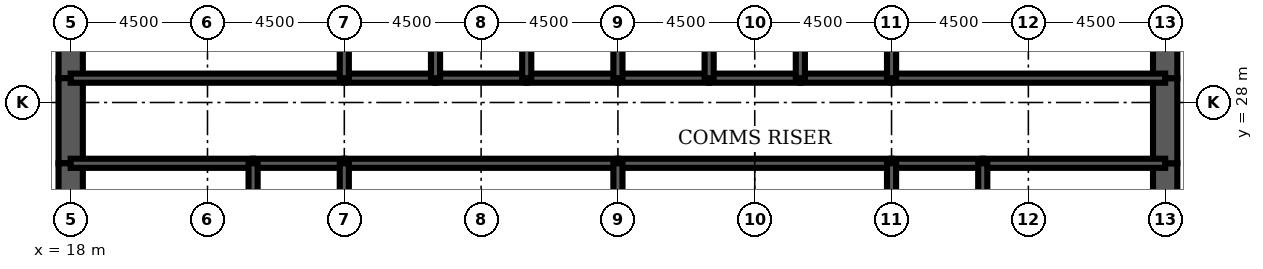
"""IFC4 building model, lengths in metres.
Left out: names, types, materials, properties, quantities, classifications, styles, units other than length and angle.
Written with IfcOpenShell. Run it as: python <this file> out.ifc"""

import sys

from ifc_helpers import new_model, si_unit, direction, frame, frame_2d, origin, place, context, subcontext, project, spatial, rectangle, extrude, element, fill, save


model = new_model("IFC4")
c1 = context("Model", 3, precision=1e-05, world=origin(), true_north=direction((0.0, 1.0)))
c2 = subcontext(c1, "Body", "Model", "MODEL_VIEW")
j1 = project(units=[si_unit("LENGTHUNIT", "METRE"), si_unit("PLANEANGLEUNIT", "RADIAN")], contexts=[c1])
p1 = place(None, origin())
s1 = spatial("IfcSite", under=j1, at=p1, CompositionType="ELEMENT")
p2 = place(p1, origin())
s2 = spatial("IfcBuilding", under=s1, at=p2, CompositionType="ELEMENT")
p3 = place(p2, frame((0.0, 0.0, 198.4)))
s3 = spatial("IfcBuildingStorey", under=s2, at=p3, CompositionType="ELEMENT", Elevation=198.4)
p4 = place(p3, frame((18.0, 32.0, 0.0), z_axis=(0.0, 0.0, 1.0), x_axis=(0.0, -1.0, 0.0)))
e1 = element("IfcWall", 1, at=p4, inside=s3, PredefinedType="SHEAR", context=c2, shape_type="SweptSolid", body=[
    extrude(rectangle(XDim=3.2, YDim=0.8, at=frame_2d((1.6, 0.0))), origin(), (0.0, 0.0, 1.0), 4.2),
])
p5 = place(p3, frame((18.0, 28.8, 0.0), z_axis=(0.0, 0.0, 1.0), x_axis=(0.0, -1.0, 0.0)))
e2 = element("IfcWall", 2, at=p5, inside=s3, PredefinedType="SHEAR", context=c2, shape_type="SweptSolid", body=[
    extrude(rectangle(XDim=2.8, YDim=0.8, at=frame_2d((1.4, 0.0))), origin(), (0.0, 0.0, 1.0), 4.2),
])
p6 = place(p5, frame((0.4, 0.0, 0.0)))
e3 = element("IfcOpeningElement", 3, at=p6, cuts=e2, PredefinedType="OPENING", context=c2, shape_type="SweptSolid", body=[
    extrude(rectangle(XDim=1.8, YDim=2.1, at=frame_2d((0.9, 1.05))), frame((0.0, 0.41, 0.0), z_axis=(0.0, -1.0, 0.0), x_axis=(1.0, 0.0, 0.0)), (0.0, 0.0, 1.0), 0.82),
])
for number, where, z_axis, x_axis in (
    (4, (18.0, 26.0, 0.0), (0.0, 0.0, 1.0), (0.0, -1.0, 0.0)),
    (5, (54.0, 22.0, 0.0), (0.0, 0.0, 1.0), (0.0, 1.0, 0.0)),
):
    element("IfcWall", number, at=place(p3, frame(where, z_axis=z_axis, x_axis=x_axis)), inside=s3, PredefinedType="SHEAR", context=c2, shape_type="SweptSolid", body=[
        extrude(rectangle(XDim=4.0, YDim=0.8, at=frame_2d((2.0, 0.0))), origin(), (0.0, 0.0, 1.0), 4.2),
    ])
p7 = place(p3, frame((54.0, 26.0, 0.0), z_axis=(0.0, 0.0, 1.0), x_axis=(0.0, 1.0, 0.0)))
e6 = element("IfcWall", 6, at=p7, inside=s3, PredefinedType="SHEAR", context=c2, shape_type="SweptSolid", body=[
    extrude(rectangle(XDim=2.8, YDim=0.8, at=frame_2d((1.4, 0.0))), origin(), (0.0, 0.0, 1.0), 4.2),
])
p8 = place(p7, frame((0.6, 0.0, 0.0)))
e7 = element("IfcOpeningElement", 7, at=p8, cuts=e6, PredefinedType="OPENING", context=c2, shape_type="SweptSolid", body=[
    extrude(rectangle(XDim=1.8, YDim=2.1, at=frame_2d((0.9, 1.05))), frame((0.0, 0.41, 0.0), z_axis=(0.0, -1.0, 0.0), x_axis=(1.0, 0.0, 0.0)), (0.0, 0.0, 1.0), 0.82),
])
p9 = place(p3, frame((54.0, 28.8, 0.0), z_axis=(0.0, 0.0, 1.0), x_axis=(0.0, 1.0, 0.0)))
e8 = element("IfcWall", 8, at=p9, inside=s3, PredefinedType="SHEAR", context=c2, shape_type="SweptSolid", body=[
    extrude(rectangle(XDim=3.2, YDim=0.8, at=frame_2d((1.6, 0.0))), origin(), (0.0, 0.0, 1.0), 4.2),
])
p10 = place(p3, frame((18.0, 28.8, 0.0), z_axis=(0.0, 0.0, 1.0), x_axis=(1.0, 0.0, 0.0)))
e9 = element("IfcWall", 9, at=p10, inside=s3, PredefinedType="SOLIDWALL", context=c2, shape_type="SweptSolid", body=[
    extrude(rectangle(XDim=9.0, YDim=0.3, at=frame_2d((4.5, 0.0))), origin(), (0.0, 0.0, 1.0), 4.2),
])
p11 = place(p10, frame((0.65, 0.0, 0.0)))
e10 = element("IfcOpeningElement", 10, at=p11, cuts=e9, PredefinedType="OPENING", context=c2, shape_type="SweptSolid", body=[
    extrude(rectangle(XDim=1.0, YDim=2.1, at=frame_2d((0.5, 1.05))), frame((0.0, 0.16, 0.0), z_axis=(0.0, -1.0, 0.0), x_axis=(1.0, 0.0, 0.0)), (0.0, 0.0, 1.0), 0.32),
])
p12 = place(p3, frame((27.0, 28.8, 0.0), z_axis=(0.0, 0.0, 1.0), x_axis=(1.0, 0.0, 0.0)))
e11 = element("IfcWall", 11, at=p12, inside=s3, PredefinedType="SOLIDWALL", context=c2, shape_type="SweptSolid", body=[
    extrude(rectangle(XDim=3.0, YDim=0.3, at=frame_2d((1.5, 0.0))), origin(), (0.0, 0.0, 1.0), 4.2),
])
p13 = place(p12, frame((0.95, 0.0, 0.0)))
e12 = element("IfcOpeningElement", 12, at=p13, cuts=e11, PredefinedType="OPENING", context=c2, shape_type="SweptSolid", body=[
    extrude(rectangle(XDim=1.1, YDim=2.2, at=frame_2d((0.55, 1.1))), frame((0.0, 0.16, 0.0), z_axis=(0.0, -1.0, 0.0), x_axis=(1.0, 0.0, 0.0)), (0.0, 0.0, 1.0), 0.32),
])
p14 = place(p3, frame((30.0, 28.8, 0.0), z_axis=(0.0, 0.0, 1.0), x_axis=(1.0, 0.0, 0.0)))
e13 = element("IfcWall", 13, at=p14, inside=s3, PredefinedType="SOLIDWALL", context=c2, shape_type="SweptSolid", body=[
    extrude(rectangle(XDim=3.0, YDim=0.3, at=frame_2d((1.5, 0.0))), origin(), (0.0, 0.0, 1.0), 4.2),
])
p15 = place(p14, frame((0.95, 0.0, 0.0)))
e14 = element("IfcOpeningElement", 14, at=p15, cuts=e13, PredefinedType="OPENING", context=c2, shape_type="SweptSolid", body=[
    extrude(rectangle(XDim=1.1, YDim=2.2, at=frame_2d((0.55, 1.1))), frame((0.0, 0.16, 0.0), z_axis=(0.0, -1.0, 0.0), x_axis=(1.0, 0.0, 0.0)), (0.0, 0.0, 1.0), 0.32),
])
p16 = place(p3, frame((33.0, 28.8, 0.0), z_axis=(0.0, 0.0, 1.0), x_axis=(1.0, 0.0, 0.0)))
e15 = element("IfcWall", 15, at=p16, inside=s3, PredefinedType="SOLIDWALL", context=c2, shape_type="SweptSolid", body=[
    extrude(rectangle(XDim=3.0, YDim=0.3, at=frame_2d((1.5, 0.0))), origin(), (0.0, 0.0, 1.0), 4.2),
])
p17 = place(p16, frame((0.95, 0.0, 0.0)))
e16 = element("IfcOpeningElement", 16, at=p17, cuts=e15, PredefinedType="OPENING", context=c2, shape_type="SweptSolid", body=[
    extrude(rectangle(XDim=1.1, YDim=2.2, at=frame_2d((0.55, 1.1))), frame((0.0, 0.16, 0.0), z_axis=(0.0, -1.0, 0.0), x_axis=(1.0, 0.0, 0.0)), (0.0, 0.0, 1.0), 0.32),
])
for number, where, z_axis, x_axis in (
    (17, (36.0, 28.8, 0.0), (0.0, 0.0, 1.0), (1.0, 0.0, 0.0)),
    (18, (39.0, 28.8, 0.0), (0.0, 0.0, 1.0), (1.0, 0.0, 0.0)),
):
    element("IfcWall", number, at=place(p3, frame(where, z_axis=z_axis, x_axis=x_axis)), inside=s3, PredefinedType="SOLIDWALL", context=c2, shape_type="SweptSolid", body=[
        extrude(rectangle(XDim=3.0, YDim=0.3, at=frame_2d((1.5, 0.0))), origin(), (0.0, 0.0, 1.0), 4.2),
    ])
p18 = place(p3, frame((42.0, 28.8, 0.0), z_axis=(0.0, 0.0, 1.0), x_axis=(1.0, 0.0, 0.0)))
e19 = element("IfcWall", 19, at=p18, inside=s3, PredefinedType="SOLIDWALL", context=c2, shape_type="SweptSolid", body=[
    extrude(rectangle(XDim=3.0, YDim=0.3, at=frame_2d((1.5, 0.0))), origin(), (0.0, 0.0, 1.0), 4.2),
])
p19 = place(p18, frame((0.95, 0.0, 0.0)))
e20 = element("IfcOpeningElement", 20, at=p19, cuts=e19, PredefinedType="OPENING", context=c2, shape_type="SweptSolid", body=[
    extrude(rectangle(XDim=1.1, YDim=2.2, at=frame_2d((0.55, 1.1))), frame((0.0, 0.16, 0.0), z_axis=(0.0, -1.0, 0.0), x_axis=(1.0, 0.0, 0.0)), (0.0, 0.0, 1.0), 0.32),
])
p20 = place(p3, frame((45.0, 28.8, 0.0), z_axis=(0.0, 0.0, 1.0), x_axis=(1.0, 0.0, 0.0)))
e21 = element("IfcWall", 21, at=p20, inside=s3, PredefinedType="SOLIDWALL", context=c2, shape_type="SweptSolid", body=[
    extrude(rectangle(XDim=9.0, YDim=0.3, at=frame_2d((4.5, 0.0))), origin(), (0.0, 0.0, 1.0), 4.2),
])
p21 = place(p20, frame((7.35, 0.0, 0.0)))
e22 = element("IfcOpeningElement", 22, at=p21, cuts=e21, PredefinedType="OPENING", context=c2, shape_type="SweptSolid", body=[
    extrude(rectangle(XDim=1.0, YDim=2.1, at=frame_2d((0.5, 1.05))), frame((0.0, 0.16, 0.0), z_axis=(0.0, -1.0, 0.0), x_axis=(1.0, 0.0, 0.0)), (0.0, 0.0, 1.0), 0.32),
])
p22 = place(p3, frame((18.0, 26.0, 0.0), z_axis=(0.0, 0.0, 1.0), x_axis=(1.0, 0.0, 0.0)))
e23 = element("IfcWall", 23, at=p22, inside=s3, PredefinedType="SOLIDWALL", context=c2, shape_type="SweptSolid", body=[
    extrude(rectangle(XDim=6.0, YDim=0.3, at=frame_2d((3.0, 0.0))), origin(), (0.0, 0.0, 1.0), 4.2),
])
p23 = place(p3, frame((24.0, 26.0, 0.0), z_axis=(0.0, 0.0, 1.0), x_axis=(1.0, 0.0, 0.0)))
e24 = element("IfcWall", 24, at=p23, inside=s3, PredefinedType="SOLIDWALL", context=c2, shape_type="SweptSolid", body=[
    extrude(rectangle(XDim=3.0, YDim=0.3, at=frame_2d((1.5, 0.0))), origin(), (0.0, 0.0, 1.0), 4.2),
])
for number, where, z_axis, x_axis in (
    (25, (27.0, 26.0, 0.0), (0.0, 0.0, 1.0), (1.0, 0.0, 0.0)),
    (26, (36.0, 26.0, 0.0), (0.0, 0.0, 1.0), (1.0, 0.0, 0.0)),
):
    element("IfcWall", number, at=place(p3, frame(where, z_axis=z_axis, x_axis=x_axis)), inside=s3, PredefinedType="SOLIDWALL", context=c2, shape_type="SweptSolid", body=[
        extrude(rectangle(XDim=9.0, YDim=0.3, at=frame_2d((4.5, 0.0))), origin(), (0.0, 0.0, 1.0), 4.2),
    ])
p24 = place(p3, frame((45.0, 26.0, 0.0), z_axis=(0.0, 0.0, 1.0), x_axis=(1.0, 0.0, 0.0)))
e27 = element("IfcWall", 27, at=p24, inside=s3, PredefinedType="SOLIDWALL", context=c2, shape_type="SweptSolid", body=[
    extrude(rectangle(XDim=3.0, YDim=0.3, at=frame_2d((1.5, 0.0))), origin(), (0.0, 0.0, 1.0), 4.2),
])
p25 = place(p3, frame((48.0, 26.0, 0.0), z_axis=(0.0, 0.0, 1.0), x_axis=(1.0, 0.0, 0.0)))
e28 = element("IfcWall", 28, at=p25, inside=s3, PredefinedType="SOLIDWALL", context=c2, shape_type="SweptSolid", body=[
    extrude(rectangle(XDim=6.0, YDim=0.3, at=frame_2d((3.0, 0.0))), origin(), (0.0, 0.0, 1.0), 4.2),
])
for number, where, z_axis, x_axis in (
    (29, (27.0, 28.8, 0.0), (0.0, 0.0, 1.0), (0.0, 1.0, 0.0)),
    (30, (30.0, 28.8, 0.0), (0.0, 0.0, 1.0), (0.0, 1.0, 0.0)),
    (31, (33.0, 28.8, 0.0), (0.0, 0.0, 1.0), (0.0, 1.0, 0.0)),
    (32, (36.0, 28.8, 0.0), (0.0, 0.0, 1.0), (0.0, 1.0, 0.0)),
    (33, (39.0, 28.8, 0.0), (0.0, 0.0, 1.0), (0.0, 1.0, 0.0)),
    (34, (42.0, 28.8, 0.0), (0.0, 0.0, 1.0), (0.0, 1.0, 0.0)),
    (35, (45.0, 28.8, 0.0), (0.0, 0.0, 1.0), (0.0, 1.0, 0.0)),
):
    element("IfcWall", number, at=place(p3, frame(where, z_axis=z_axis, x_axis=x_axis)), inside=s3, PredefinedType="SOLIDWALL", context=c2, shape_type="SweptSolid", body=[
        extrude(rectangle(XDim=3.2, YDim=0.3, at=frame_2d((1.6, 0.0))), origin(), (0.0, 0.0, 1.0), 4.2),
    ])
for number, where, z_axis, x_axis in (
    (36, (24.0, 22.0, 0.0), (0.0, 0.0, 1.0), (0.0, 1.0, 0.0)),
    (37, (27.0, 22.0, 0.0), (0.0, 0.0, 1.0), (0.0, 1.0, 0.0)),
    (38, (36.0, 22.0, 0.0), (0.0, 0.0, 1.0), (0.0, 1.0, 0.0)),
    (39, (45.0, 22.0, 0.0), (0.0, 0.0, 1.0), (0.0, 1.0, 0.0)),
    (40, (48.0, 22.0, 0.0), (0.0, 0.0, 1.0), (0.0, 1.0, 0.0)),
):
    element("IfcWall", number, at=place(p3, frame(where, z_axis=z_axis, x_axis=x_axis)), inside=s3, PredefinedType="SOLIDWALL", context=c2, shape_type="SweptSolid", body=[
        extrude(rectangle(XDim=4.0, YDim=0.3, at=frame_2d((2.0, 0.0))), origin(), (0.0, 0.0, 1.0), 4.2),
    ])
p26 = place(p3, frame((42.0, 22.15, 0.0), z_axis=(0.0, 0.0, 1.0), x_axis=(0.0, 1.0, 0.0)))
e41 = element("IfcWall", 41, at=p26, inside=s3, PredefinedType="PARTITIONING", context=c2, shape_type="SweptSolid", body=[
    extrude(rectangle(XDim=3.7, YDim=0.15, at=frame_2d((1.85, 0.0))), origin(), (0.0, 0.0, 1.0), 3.0),
])
p27 = place(p26, frame((2.2, 0.0, 0.0)))
e42 = element("IfcOpeningElement", 42, at=p27, cuts=e41, PredefinedType="OPENING", context=c2, shape_type="SweptSolid", body=[
    extrude(rectangle(XDim=1.0, YDim=2.1, at=frame_2d((0.5, 1.05))), frame((0.0, 0.085, 0.0), z_axis=(0.0, -1.0, 0.0), x_axis=(1.0, 0.0, 0.0)), (0.0, 0.0, 1.0), 0.17),
])
p28 = place(p3, frame((51.425, 22.15, 0.0), z_axis=(0.0, 0.0, 1.0), x_axis=(0.0, 1.0, 0.0)))
e43 = element("IfcWall", 43, at=p28, inside=s3, PredefinedType="PARTITIONING", context=c2, shape_type="SweptSolid", body=[
    extrude(rectangle(XDim=3.7, YDim=0.15, at=frame_2d((1.85, 0.0))), origin(), (0.0, 0.0, 1.0), 3.0),
])
p29 = place(p27, origin())
e44 = element("IfcDoor", 44, at=p29, inside=s3, OperationType="SINGLE_SWING_RIGHT", PredefinedType="DOOR", context=c2, shape_type="SweptSolid", body=[
    extrude(rectangle(XDim=1.0, YDim=2.1, at=frame_2d((0.5, 1.05))), frame((0.0, 0.025, 0.0), z_axis=(0.0, -1.0, 0.0), x_axis=(1.0, 0.0, 0.0)), (0.0, 0.0, 1.0), 0.05),
])
fill(e42, e44)
p30 = place(p19, origin())
e45 = element("IfcDoor", 45, at=p30, inside=s3, OperationType="DOUBLE_DOOR_SLIDING", PredefinedType="USERDEFINED", context=c2, shape_type="SweptSolid", body=[
    extrude(rectangle(XDim=1.1, YDim=2.2, at=frame_2d((0.55, 1.1))), frame((0.0, 0.025, 0.0), z_axis=(0.0, -1.0, 0.0), x_axis=(1.0, 0.0, 0.0)), (0.0, 0.0, 1.0), 0.05),
])
fill(e20, e45)
p31 = place(p13, origin())
e46 = element("IfcDoor", 46, at=p31, inside=s3, OperationType="DOUBLE_DOOR_SLIDING", PredefinedType="USERDEFINED", context=c2, shape_type="SweptSolid", body=[
    extrude(rectangle(XDim=1.1, YDim=2.2, at=frame_2d((0.55, 1.1))), frame((0.0, 0.025, 0.0), z_axis=(0.0, -1.0, 0.0), x_axis=(1.0, 0.0, 0.0)), (0.0, 0.0, 1.0), 0.05),
])
fill(e12, e46)
p32 = place(p15, origin())
e47 = element("IfcDoor", 47, at=p32, inside=s3, OperationType="DOUBLE_DOOR_SLIDING", PredefinedType="USERDEFINED", context=c2, shape_type="SweptSolid", body=[
    extrude(rectangle(XDim=1.1, YDim=2.2, at=frame_2d((0.55, 1.1))), frame((0.0, 0.025, 0.0), z_axis=(0.0, -1.0, 0.0), x_axis=(1.0, 0.0, 0.0)), (0.0, 0.0, 1.0), 0.05),
])
fill(e14, e47)
p33 = place(p17, origin())
e48 = element("IfcDoor", 48, at=p33, inside=s3, OperationType="DOUBLE_DOOR_SLIDING", PredefinedType="USERDEFINED", context=c2, shape_type="SweptSolid", body=[
    extrude(rectangle(XDim=1.1, YDim=2.2, at=frame_2d((0.55, 1.1))), frame((0.0, 0.025, 0.0), z_axis=(0.0, -1.0, 0.0), x_axis=(1.0, 0.0, 0.0)), (0.0, 0.0, 1.0), 0.05),
])
fill(e16, e48)
p34 = place(p11, origin())
e49 = element("IfcDoor", 49, at=p34, inside=s3, OperationType="SINGLE_SWING_LEFT", PredefinedType="DOOR", context=c2, shape_type="SweptSolid", body=[
    extrude(rectangle(XDim=1.0, YDim=2.1, at=frame_2d((0.5, 1.05))), frame((0.0, 0.025, 0.0), z_axis=(0.0, -1.0, 0.0), x_axis=(1.0, 0.0, 0.0)), (0.0, 0.0, 1.0), 0.05),
])
fill(e10, e49)
p35 = place(p21, origin())
e50 = element("IfcDoor", 50, at=p35, inside=s3, OperationType="SINGLE_SWING_RIGHT", PredefinedType="DOOR", context=c2, shape_type="SweptSolid", body=[
    extrude(rectangle(XDim=1.0, YDim=2.1, at=frame_2d((0.5, 1.05))), frame((0.0, 0.025, 0.0), z_axis=(0.0, -1.0, 0.0), x_axis=(1.0, 0.0, 0.0)), (0.0, 0.0, 1.0), 0.05),
])
fill(e22, e50)
p36 = place(p6, origin())
e51 = element("IfcDoor", 51, at=p36, inside=s3, OperationType="SINGLE_SWING_LEFT", PredefinedType="DOOR", context=c2, shape_type="SweptSolid", body=[
    extrude(rectangle(XDim=1.8, YDim=2.1, at=frame_2d((0.9, 1.05))), frame((0.0, 0.4, 0.0), z_axis=(0.0, -1.0, 0.0), x_axis=(1.0, 0.0, 0.0)), (0.0, 0.0, 1.0), 0.8),
])
fill(e3, e51)
p37 = place(p8, origin())
e52 = element("IfcDoor", 52, at=p37, inside=s3, OperationType="SINGLE_SWING_LEFT", PredefinedType="DOOR", context=c2, shape_type="SweptSolid", body=[
    extrude(rectangle(XDim=1.8, YDim=2.1, at=frame_2d((0.9, 1.05))), frame((0.0, 0.4, 0.0), z_axis=(0.0, -1.0, 0.0), x_axis=(1.0, 0.0, 0.0)), (0.0, 0.0, 1.0), 0.8),
])
fill(e7, e52)
save(model, sys.argv[1])
